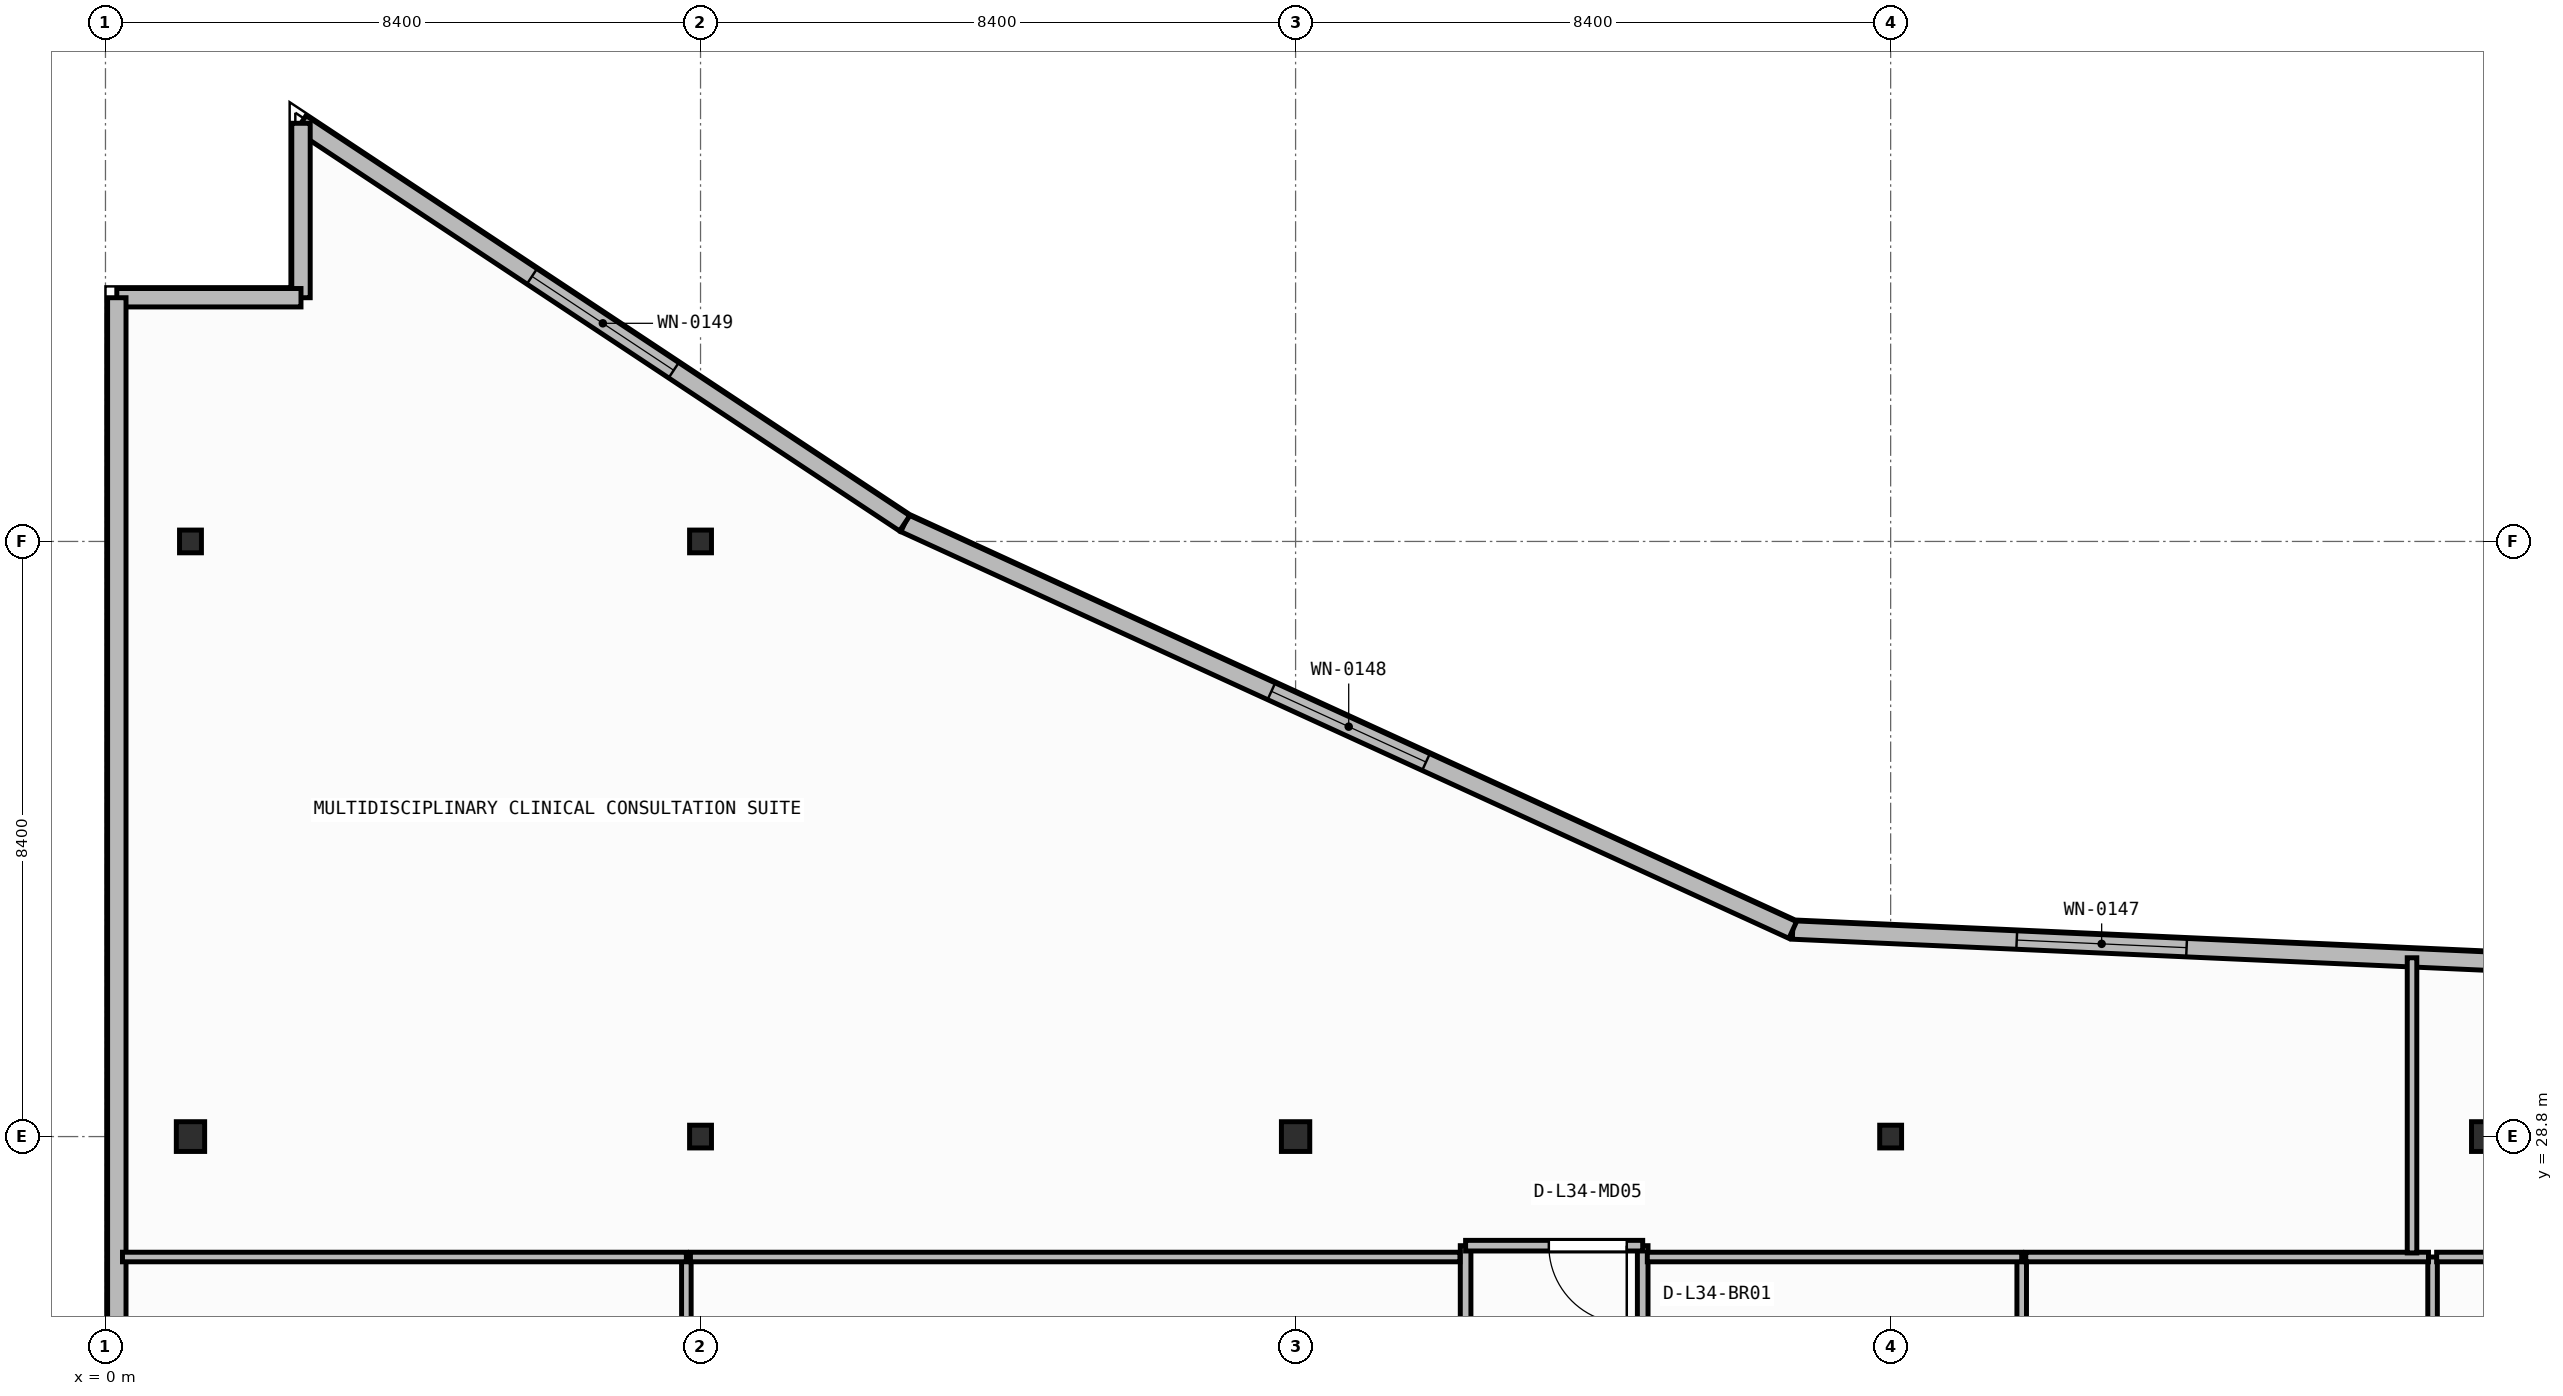
"""IFC4 building model, lengths in metres.
Left out: names, types, materials, properties, quantities, classifications, styles, units other than length and angle.
Written with IfcOpenShell. Run it as: python <this file> out.ifc"""

import sys

from ifc_helpers import new_model, si_unit, direction, frame, frame_2d, origin, origin_2d, place, context, subcontext, project, spatial, rectangle, i_section, extrude, element, fill, save


model = new_model("IFC4")
c1 = context("Model", 3, precision=1e-05, world=origin(), true_north=direction((0.0, 1.0)))
c2 = subcontext(c1, "Body", "Model", "MODEL_VIEW")
j1 = project(units=[si_unit("LENGTHUNIT", "METRE"), si_unit("PLANEANGLEUNIT", "RADIAN")], contexts=[c1])
p1 = place(None, origin())
s1 = spatial("IfcSite", under=j1, at=p1, CompositionType="ELEMENT")
p2 = place(p1, origin())
s2 = spatial("IfcBuilding", under=s1, at=p2, CompositionType="ELEMENT")
p3 = place(p2, frame((0.0, 0.0, 138.9)))
s3 = spatial("IfcBuildingStorey", under=s2, at=p3, CompositionType="ELEMENT", Elevation=138.9)
p4 = place(p3, frame((1.2, 28.8, 0.0), z_axis=(0.0, 0.0, 1.0), x_axis=(1.0, 0.0, 0.0)))
e1 = element("IfcColumn", 1, at=p4, inside=s3, PredefinedType="COLUMN", context=c2, shape_type="SweptSolid", body=[
    extrude(i_section(OverallWidth=0.4, OverallDepth=0.42, WebThickness=0.025, FlangeThickness=0.04, at=origin_2d()), origin(), (0.0, 0.0, 1.0), 3.95),
])
p5 = place(p3, frame((8.4, 28.8, 0.0), z_axis=(0.0, 0.0, 1.0), x_axis=(1.0, 0.0, 0.0)))
e2 = element("IfcColumn", 2, at=p5, inside=s3, PredefinedType="COLUMN", context=c2, shape_type="SweptSolid", body=[
    extrude(i_section(OverallWidth=0.309, OverallDepth=0.321, WebThickness=0.014, FlangeThickness=0.022, FilletRadius=0.017, at=origin_2d()), origin(), (0.0, 0.0, 1.0), 3.95),
])
p6 = place(p3, frame((16.8, 28.8, 0.0), z_axis=(0.0, 0.0, 1.0), x_axis=(1.0, 0.0, 0.0)))
e3 = element("IfcColumn", 3, at=p6, inside=s3, PredefinedType="COLUMN", context=c2, shape_type="SweptSolid", body=[
    extrude(i_section(OverallWidth=0.4, OverallDepth=0.42, WebThickness=0.025, FlangeThickness=0.04, at=origin_2d()), origin(), (0.0, 0.0, 1.0), 3.95),
])
p7 = place(p3, frame((25.2, 28.8, 0.0), z_axis=(0.0, 0.0, 1.0), x_axis=(1.0, 0.0, 0.0)))
e4 = element("IfcColumn", 4, at=p7, inside=s3, PredefinedType="COLUMN", context=c2, shape_type="SweptSolid", body=[
    extrude(i_section(OverallWidth=0.309, OverallDepth=0.321, WebThickness=0.014, FlangeThickness=0.022, FilletRadius=0.017, at=origin_2d()), origin(), (0.0, 0.0, 1.0), 3.95),
])
p8 = place(p3, frame((33.6, 28.8, 0.0), z_axis=(0.0, 0.0, 1.0), x_axis=(1.0, 0.0, 0.0)))
e5 = element("IfcColumn", 5, at=p8, inside=s3, PredefinedType="COLUMN", context=c2, shape_type="SweptSolid", body=[
    extrude(i_section(OverallWidth=0.4, OverallDepth=0.42, WebThickness=0.025, FlangeThickness=0.04, at=origin_2d()), origin(), (0.0, 0.0, 1.0), 3.95),
])
for number, where, z_axis, x_axis in (
    (6, (1.2, 37.2, 0.0), (0.0, 0.0, 1.0), (1.0, 0.0, 0.0)),
    (7, (8.4, 37.2, 0.0), (0.0, 0.0, 1.0), (1.0, 0.0, 0.0)),
):
    element("IfcColumn", number, at=place(p3, frame(where, z_axis=z_axis, x_axis=x_axis)), inside=s3, PredefinedType="COLUMN", context=c2, shape_type="SweptSolid", body=[
        extrude(i_section(OverallWidth=0.309, OverallDepth=0.321, WebThickness=0.014, FlangeThickness=0.022, FilletRadius=0.017, at=origin_2d()), origin(), (0.0, 0.0, 1.0), 3.95),
    ])
p9 = place(p3, frame((38.63, 31.052, 0.0), z_axis=(0.0, 0.0, 1.0), x_axis=(-0.998996592956, 0.044786239663, 0.0)))
e8 = element("IfcWall", 8, at=p9, inside=s3, PredefinedType="STANDARD", context=c2, shape_type="SweptSolid", body=[
    extrude(rectangle(XDim=14.827, YDim=0.26, at=frame_2d((7.414, 0.0))), origin(), (0.0, 0.0, 1.0), 3.71),
])
p10 = place(p9, frame((9.262, 0.0, 0.9)))
e9 = element("IfcOpeningElement", 9, at=p10, cuts=e8, PredefinedType="OPENING", context=c2, shape_type="SweptSolid", body=[
    extrude(rectangle(XDim=2.4, YDim=1.65, at=frame_2d((1.2, 0.825))), frame((0.0, 0.14, 0.0), z_axis=(0.0, -1.0, 0.0), x_axis=(1.0, 0.0, 0.0)), (0.0, 0.0, 1.0), 0.28),
])
p11 = place(p3, frame((23.818, 31.716, 0.0), z_axis=(0.0, 0.0, 1.0), x_axis=(-0.909209527513, 0.416338846471, 0.0)))
e10 = element("IfcWall", 10, at=p11, inside=s3, PredefinedType="STANDARD", context=c2, shape_type="SweptSolid", body=[
    extrude(rectangle(XDim=13.787, YDim=0.26, at=frame_2d((6.894, 0.0))), origin(), (0.0, 0.0, 1.0), 3.71),
])
p12 = place(p11, frame((5.694, 0.0, 0.9)))
e11 = element("IfcOpeningElement", 11, at=p12, cuts=e10, PredefinedType="OPENING", context=c2, shape_type="SweptSolid", body=[
    extrude(rectangle(XDim=2.4, YDim=1.65, at=frame_2d((1.2, 0.825))), frame((0.0, 0.14, 0.0), z_axis=(0.0, -1.0, 0.0), x_axis=(1.0, 0.0, 0.0)), (0.0, 0.0, 1.0), 0.28),
])
p13 = place(p3, frame((11.282, 37.456, 0.0), z_axis=(0.0, 0.0, 1.0), x_axis=(-0.833630474253, 0.552322580017, 0.0)))
e12 = element("IfcWall", 12, at=p13, inside=s3, PredefinedType="STANDARD", context=c2, shape_type="SweptSolid", body=[
    extrude(rectangle(XDim=10.223, YDim=0.26, at=frame_2d((5.111, 0.0))), origin(), (0.0, 0.0, 1.0), 3.71),
])
p14 = place(p13, frame((3.911, 0.0, 0.9)))
e13 = element("IfcOpeningElement", 13, at=p14, cuts=e12, PredefinedType="OPENING", context=c2, shape_type="SweptSolid", body=[
    extrude(rectangle(XDim=2.4, YDim=1.65, at=frame_2d((1.2, 0.825))), frame((0.0, 0.14, 0.0), z_axis=(0.0, -1.0, 0.0), x_axis=(1.0, 0.0, 0.0)), (0.0, 0.0, 1.0), 0.28),
])
p15 = place(p3, frame((2.76, 43.102, 0.0), z_axis=(0.0, 0.0, 1.0), x_axis=(0.0, -1.0, 0.0)))
e14 = element("IfcWall", 14, at=p15, inside=s3, PredefinedType="STANDARD", context=c2, shape_type="SweptSolid", body=[
    extrude(rectangle(XDim=2.462, YDim=0.26, at=frame_2d((1.231, 0.0))), origin(), (0.0, 0.0, 1.0), 3.71),
])
p16 = place(p3, frame((2.76, 40.64, 0.0), z_axis=(0.0, 0.0, 1.0), x_axis=(-1.0, 0.0, 0.0)))
e15 = element("IfcWall", 15, at=p16, inside=s3, PredefinedType="STANDARD", context=c2, shape_type="SweptSolid", body=[
    extrude(rectangle(XDim=2.6, YDim=0.26, at=frame_2d((1.3, 0.0))), origin(), (0.0, 0.0, 1.0), 3.71),
])
p17 = place(p3, frame((0.16, 40.64, 0.0), z_axis=(0.0, 0.0, 1.0), x_axis=(0.0, -1.0, 0.0)))
e16 = element("IfcWall", 16, at=p17, inside=s3, PredefinedType="STANDARD", context=c2, shape_type="SweptSolid", body=[
    extrude(rectangle(XDim=37.88, YDim=0.26, at=frame_2d((18.94, 0.0))), origin(), (0.0, 0.0, 1.0), 3.71),
])
p18 = place(p17, frame((29.865, 0.0, 0.0)))
e17 = element("IfcOpeningElement", 17, at=p18, cuts=e16, PredefinedType="OPENING", context=c2, shape_type="SweptSolid", body=[
    extrude(rectangle(XDim=1.3, YDim=2.15, at=frame_2d((0.65, 1.075))), frame((0.0, 0.14, 0.0), z_axis=(0.0, -1.0, 0.0), x_axis=(1.0, 0.0, 0.0)), (0.0, 0.0, 1.0), 0.28),
])
p19 = place(p3, frame((19.2, 27.26, 0.0), z_axis=(0.0, 0.0, 1.0), x_axis=(0.0, -1.0, 0.0)))
e18 = element("IfcWall", 18, at=p19, inside=s3, PredefinedType="PARTITIONING", context=c2, shape_type="SweptSolid", body=[
    extrude(rectangle(XDim=12.56, YDim=0.15, at=frame_2d((6.28, 0.0))), origin(), (0.0, 0.0, 1.0), 3.71),
])
p20 = place(p3, frame((21.7, 23.784, 0.0), z_axis=(0.0, 0.0, 1.0), x_axis=(0.0, 1.0, 0.0)))
e19 = element("IfcWall", 19, at=p20, inside=s3, PredefinedType="PARTITIONING", context=c2, shape_type="SweptSolid", body=[
    extrude(rectangle(XDim=3.476, YDim=0.15, at=frame_2d((1.738, 0.0))), origin(), (0.0, 0.0, 1.0), 3.71),
])
p21 = place(p20, frame((1.088, 0.0, 0.0)))
e20 = element("IfcOpeningElement", 20, at=p21, cuts=e19, PredefinedType="OPENING", context=c2, shape_type="SweptSolid", body=[
    extrude(rectangle(XDim=1.3, YDim=2.15, at=frame_2d((0.65, 1.075))), frame((0.0, 0.085, 0.0), z_axis=(0.0, -1.0, 0.0), x_axis=(1.0, 0.0, 0.0)), (0.0, 0.0, 1.0), 0.17),
])
p22 = place(p3, frame((21.7, 27.26, 0.0), z_axis=(0.0, 0.0, 1.0), x_axis=(-1.0, 0.0, 0.0)))
e21 = element("IfcWall", 21, at=p22, inside=s3, PredefinedType="PARTITIONING", context=c2, shape_type="SweptSolid", body=[
    extrude(rectangle(XDim=2.5, YDim=0.15, at=frame_2d((1.25, 0.0))), origin(), (0.0, 0.0, 1.0), 3.71),
])
p23 = place(p22, frame((0.225, 0.0, 0.0)))
e22 = element("IfcOpeningElement", 22, at=p23, cuts=e21, PredefinedType="OPENING", context=c2, shape_type="SweptSolid", body=[
    extrude(rectangle(XDim=1.1, YDim=2.1, at=frame_2d((0.55, 1.05))), frame((0.0, 0.085, 0.0), z_axis=(0.0, -1.0, 0.0), x_axis=(1.0, 0.0, 0.0)), (0.0, 0.0, 1.0), 0.17),
])
p24 = place(p3, frame((8.2, 14.76, 0.0), z_axis=(0.0, 0.0, 1.0), x_axis=(0.0, 1.0, 0.0)))
e23 = element("IfcWall", 23, at=p24, inside=s3, PredefinedType="PARTITIONING", context=c2, shape_type="SweptSolid", body=[
    extrude(rectangle(XDim=12.34, YDim=0.135, at=frame_2d((6.17, 0.0))), origin(), (0.0, 0.0, 1.0), 3.152),
])
p25 = place(p3, frame((8.2, 27.1, 0.0), z_axis=(0.0, 0.0, 1.0), x_axis=(-1.0, 0.0, 0.0)))
e24 = element("IfcWall", 24, at=p25, inside=s3, PredefinedType="PARTITIONING", context=c2, shape_type="SweptSolid", body=[
    extrude(rectangle(XDim=7.96, YDim=0.135, at=frame_2d((3.98, 0.0))), origin(), (0.0, 0.0, 1.0), 3.71),
])
p26 = place(p3, frame((19.12, 27.1, 0.0), z_axis=(0.0, 0.0, 1.0), x_axis=(-1.0, 0.0, 0.0)))
e25 = element("IfcWall", 25, at=p26, inside=s3, PredefinedType="PARTITIONING", context=c2, shape_type="SweptSolid", body=[
    extrude(rectangle(XDim=10.863, YDim=0.135, at=frame_2d((5.431, 0.0))), origin(), (0.0, 0.0, 1.0), 3.71),
])
p27 = place(p3, frame((27.05, 23.802, 0.0), z_axis=(0.0, 0.0, 1.0), x_axis=(0.0, 1.0, 0.0)))
e26 = element("IfcWall", 26, at=p27, inside=s3, PredefinedType="PARTITIONING", context=c2, shape_type="SweptSolid", body=[
    extrude(rectangle(XDim=3.298, YDim=0.135, at=frame_2d((1.649, 0.0))), origin(), (0.0, 0.0, 1.0), 3.71),
])
p28 = place(p3, frame((27.05, 27.1, 0.0), z_axis=(0.0, 0.0, 1.0), x_axis=(-1.0, 0.0, 0.0)))
e27 = element("IfcWall", 27, at=p28, inside=s3, PredefinedType="PARTITIONING", context=c2, shape_type="SweptSolid", body=[
    extrude(rectangle(XDim=5.285, YDim=0.135, at=frame_2d((2.643, 0.0))), origin(), (0.0, 0.0, 1.0), 3.71),
])
p29 = place(p3, frame((32.85, 20.715, 0.0), z_axis=(0.0, 0.0, 1.0), x_axis=(0.0, 1.0, 0.0)))
e28 = element("IfcWall", 28, at=p29, inside=s3, PredefinedType="PARTITIONING", context=c2, shape_type="SweptSolid", body=[
    extrude(rectangle(XDim=6.385, YDim=0.135, at=frame_2d((3.192, 0.0))), origin(), (0.0, 0.0, 1.0), 3.71),
])
p30 = place(p3, frame((32.792, 27.1, 0.0), z_axis=(0.0, 0.0, 1.0), x_axis=(-1.0, 0.0, 0.0)))
e29 = element("IfcWall", 29, at=p30, inside=s3, PredefinedType="PARTITIONING", context=c2, shape_type="SweptSolid", body=[
    extrude(rectangle(XDim=5.685, YDim=0.135, at=frame_2d((2.843, 0.0))), origin(), (0.0, 0.0, 1.0), 3.71),
])
p31 = place(p3, frame((39.11, 27.1, 0.0), z_axis=(0.0, 0.0, 1.0), x_axis=(-1.0, 0.0, 0.0)))
e30 = element("IfcWall", 30, at=p31, inside=s3, PredefinedType="PARTITIONING", context=c2, shape_type="SweptSolid", body=[
    extrude(rectangle(XDim=6.203, YDim=0.135, at=frame_2d((3.101, 0.0))), origin(), (0.0, 0.0, 1.0), 3.71),
])
p32 = place(p31, frame((0.318, 0.0, 0.0)))
e31 = element("IfcOpeningElement", 31, at=p32, cuts=e30, PredefinedType="OPENING", context=c2, shape_type="SweptSolid", body=[
    extrude(rectangle(XDim=1.1, YDim=2.1, at=frame_2d((0.55, 1.05))), frame((0.0, 0.077, 0.0), z_axis=(0.0, -1.0, 0.0), x_axis=(1.0, 0.0, 0.0)), (0.0, 0.0, 1.0), 0.155),
])
p33 = place(p3, frame((32.56, 27.157, 0.0), z_axis=(0.0, 0.0, 1.0), x_axis=(0.0, 1.0, 0.0)))
e32 = element("IfcWall", 32, at=p33, inside=s3, PredefinedType="PARTITIONING", context=c2, shape_type="SweptSolid", body=[
    extrude(rectangle(XDim=4.166, YDim=0.135, at=frame_2d((2.083, 0.0))), origin(), (0.0, 0.0, 1.0), 3.71),
])
p34 = place(p10, origin())
e33 = element("IfcWindow", 33, at=p34, inside=s3, PartitioningType="SINGLE_PANEL", PredefinedType="WINDOW", context=c2, shape_type="SweptSolid", body=[
    extrude(rectangle(XDim=2.4, YDim=1.65, at=frame_2d((1.2, 0.825))), frame((0.0, 0.03, 0.0), z_axis=(0.0, -1.0, 0.0), x_axis=(1.0, 0.0, 0.0)), (0.0, 0.0, 1.0), 0.06),
])
fill(e9, e33)
p35 = place(p12, origin())
e34 = element("IfcWindow", 34, at=p35, inside=s3, PartitioningType="SINGLE_PANEL", PredefinedType="WINDOW", context=c2, shape_type="SweptSolid", body=[
    extrude(rectangle(XDim=2.4, YDim=1.65, at=frame_2d((1.2, 0.825))), frame((0.0, 0.03, 0.0), z_axis=(0.0, -1.0, 0.0), x_axis=(1.0, 0.0, 0.0)), (0.0, 0.0, 1.0), 0.06),
])
fill(e11, e34)
p36 = place(p14, origin())
e35 = element("IfcWindow", 35, at=p36, inside=s3, PartitioningType="SINGLE_PANEL", PredefinedType="WINDOW", context=c2, shape_type="SweptSolid", body=[
    extrude(rectangle(XDim=2.4, YDim=1.65, at=frame_2d((1.2, 0.825))), frame((0.0, 0.03, 0.0), z_axis=(0.0, -1.0, 0.0), x_axis=(1.0, 0.0, 0.0)), (0.0, 0.0, 1.0), 0.06),
])
fill(e13, e35)
p37 = place(p23, origin())
e36 = element("IfcDoor", 36, at=p37, inside=s3, OperationType="SINGLE_SWING_LEFT", PredefinedType="DOOR", context=c2, shape_type="SweptSolid", body=[
    extrude(rectangle(XDim=1.1, YDim=2.1, at=frame_2d((0.55, 1.05))), frame((0.0, 0.025, 0.0), z_axis=(0.0, -1.0, 0.0), x_axis=(1.0, 0.0, 0.0)), (0.0, 0.0, 1.0), 0.05),
])
fill(e22, e36)
save(model, sys.argv[1])
